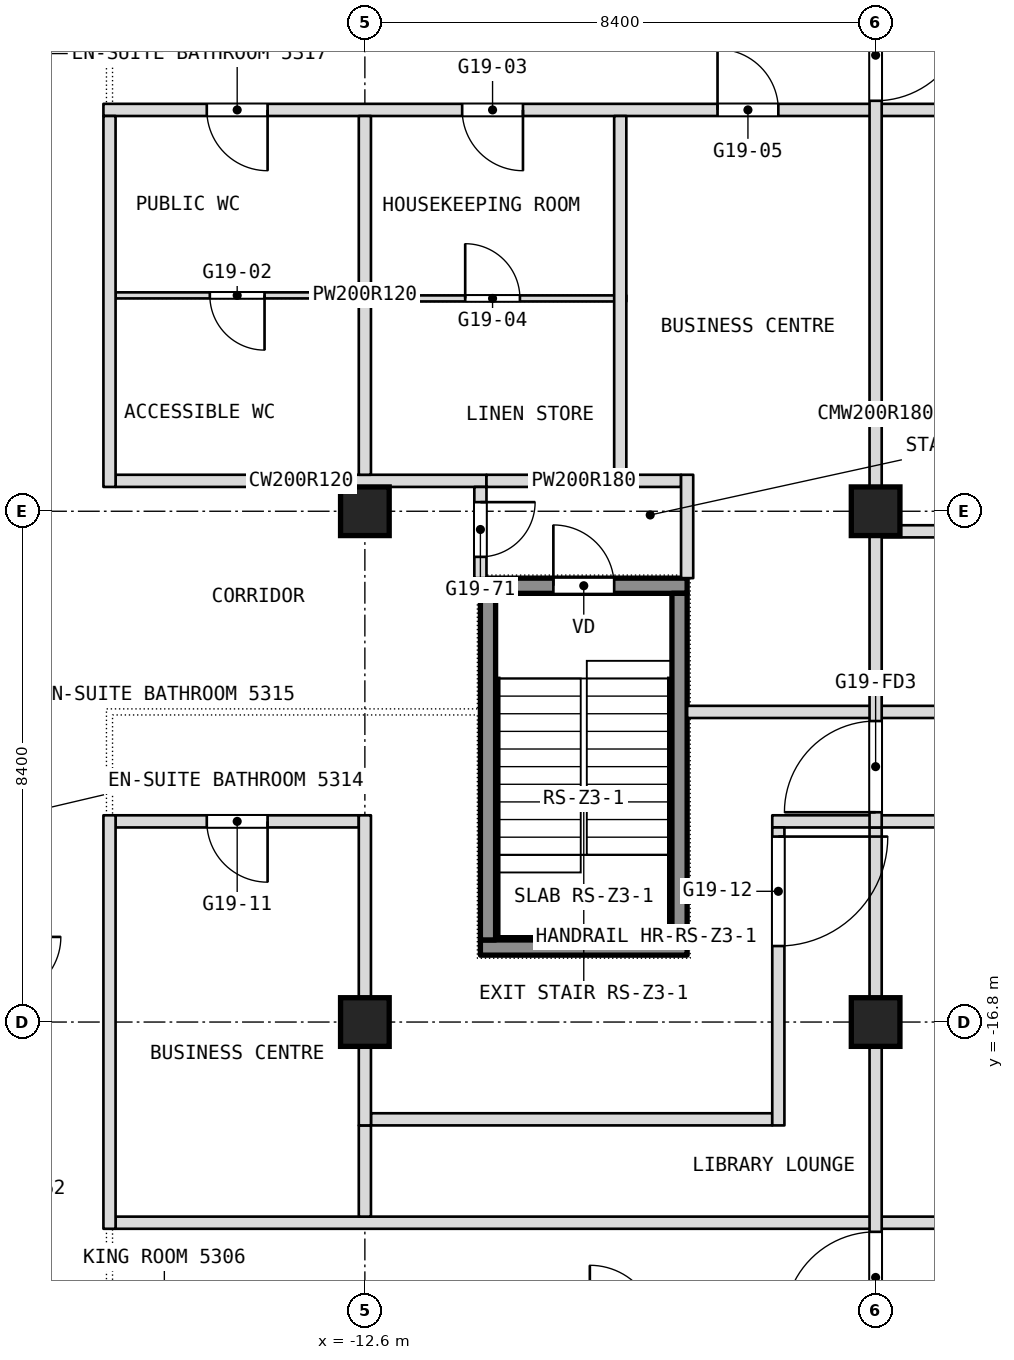
"""IFC4 building model, lengths in metres.
Left out: names, types, materials, properties, quantities, classifications, styles, units other than length and angle.
Written with IfcOpenShell. Run it as: python <this file> out.ifc"""

import sys

from ifc_helpers import new_model, si_unit, direction, frame, frame_2d, origin, origin_2d, place, context, subcontext, project, spatial, rectangle, extrude, element, fill, save


model = new_model("IFC4")
c1 = context("Model", 3, precision=1e-05, world=origin(), true_north=direction((0.0, 1.0)))
c2 = subcontext(c1, "Body", "Model", "MODEL_VIEW")
j1 = project(units=[si_unit("LENGTHUNIT", "METRE"), si_unit("PLANEANGLEUNIT", "RADIAN")], contexts=[c1])
p1 = place(None, origin())
s1 = spatial("IfcSite", under=j1, at=p1, CompositionType="ELEMENT")
p2 = place(p1, origin())
s2 = spatial("IfcBuilding", under=s1, at=p2, CompositionType="ELEMENT")
p3 = place(p2, frame((0.0, 0.0, 227.3)))
s3 = spatial("IfcBuildingStorey", under=s2, at=p3, CompositionType="ELEMENT", Elevation=227.3)
for number, where, z_axis, x_axis in (
    (1, (-12.6, -16.8, 0.0), (0.0, 0.0, 1.0), (1.0, 0.0, 0.0)),
    (2, (-12.6, -8.4, 0.0), (0.0, 0.0, 1.0), (1.0, 0.0, 0.0)),
    (3, (-4.2, -16.8, 0.0), (0.0, 0.0, 1.0), (1.0, 0.0, 0.0)),
    (4, (-4.2, -8.4, 0.0), (0.0, 0.0, 1.0), (1.0, 0.0, 0.0)),
):
    element("IfcColumn", number, at=place(p3, frame(where, z_axis=z_axis, x_axis=x_axis)), inside=s3, PredefinedType="COLUMN", context=c2, shape_type="SweptSolid", body=[
        extrude(rectangle(XDim=0.8, YDim=0.8, at=origin_2d()), origin(), (0.0, 0.0, 1.0), 3.6),
    ])
p4 = place(p3, frame((-16.7, -20.1, 0.0), z_axis=(0.0, 0.0, 1.0), x_axis=(1.0, 0.0, 0.0)))
e5 = element("IfcWall", 5, at=p4, inside=s3, PredefinedType="PARTITIONING", context=c2, shape_type="SweptSolid", body=[
    extrude(rectangle(XDim=33.4, YDim=0.2, at=frame_2d((16.7, 0.0))), origin(), (0.0, 0.0, 1.0), 3.34),
])
p5 = place(p3, frame((-12.5, -18.4, 0.0), z_axis=(0.0, 0.0, 1.0), x_axis=(1.0, 0.0, 0.0)))
e6 = element("IfcWall", 6, at=p5, inside=s3, PredefinedType="PARTITIONING", context=c2, shape_type="SweptSolid", body=[
    extrude(rectangle(XDim=6.6, YDim=0.2, at=frame_2d((3.3, 0.0))), origin(), (0.0, 0.0, 1.0), 3.34),
])
p6 = place(p3, frame((-16.7, -13.5, 0.0), z_axis=(0.0, 0.0, 1.0), x_axis=(1.0, 0.0, 0.0)))
e7 = element("IfcWall", 7, at=p6, inside=s3, PredefinedType="PARTITIONING", context=c2, shape_type="SweptSolid", body=[
    extrude(rectangle(XDim=4.0, YDim=0.2, at=frame_2d((2.0, 0.0))), origin(), (0.0, 0.0, 1.0), 3.34),
])
p7 = place(p6, frame((1.5, 0.0, 0.0)))
e8 = element("IfcOpeningElement", 8, at=p7, cuts=e7, PredefinedType="OPENING", context=c2, shape_type="SweptSolid", body=[
    extrude(rectangle(XDim=1.0, YDim=2.1, at=frame_2d((0.5, 1.05))), frame((0.0, 0.1, 0.0), z_axis=(0.0, -1.0, 0.0), x_axis=(1.0, 0.0, 0.0)), (0.0, 0.0, 1.0), 0.2),
])
p8 = place(p3, frame((-5.9, -13.5, 0.0), z_axis=(0.0, 0.0, 1.0), x_axis=(1.0, 0.0, 0.0)))
e9 = element("IfcWall", 9, at=p8, inside=s3, PredefinedType="PARTITIONING", context=c2, shape_type="SweptSolid", body=[
    extrude(rectangle(XDim=11.6, YDim=0.2, at=frame_2d((5.8, 0.0))), origin(), (0.0, 0.0, 1.0), 3.34),
])
p9 = place(p8, frame((3.3, 0.0, 0.0)))
e10 = element("IfcOpeningElement", 10, at=p9, cuts=e9, PredefinedType="OPENING", context=c2, shape_type="SweptSolid", body=[
    extrude(rectangle(XDim=1.0, YDim=2.1, at=frame_2d((0.5, 1.05))), frame((0.0, 0.1, 0.0), z_axis=(0.0, -1.0, 0.0), x_axis=(1.0, 0.0, 0.0)), (0.0, 0.0, 1.0), 0.2),
])
p10 = place(p8, frame((7.5, 0.0, 0.0)))
e11 = element("IfcOpeningElement", 11, at=p10, cuts=e9, PredefinedType="OPENING", context=c2, shape_type="SweptSolid", body=[
    extrude(rectangle(XDim=1.0, YDim=2.1, at=frame_2d((0.5, 1.05))), frame((0.0, 0.1, 0.0), z_axis=(0.0, -1.0, 0.0), x_axis=(1.0, 0.0, 0.0)), (0.0, 0.0, 1.0), 0.2),
])
p11 = place(p3, frame((-7.3, -11.7, 0.0), z_axis=(0.0, 0.0, 1.0), x_axis=(1.0, 0.0, 0.0)))
e12 = element("IfcWall", 12, at=p11, inside=s3, PredefinedType="PARTITIONING", context=c2, shape_type="SweptSolid", body=[
    extrude(rectangle(XDim=14.6, YDim=0.2, at=frame_2d((7.3, 0.0))), origin(), (0.0, 0.0, 1.0), 3.34),
])
p12 = place(p11, frame((6.8, 0.0, 0.0)))
e13 = element("IfcOpeningElement", 13, at=p12, cuts=e12, PredefinedType="OPENING", context=c2, shape_type="SweptSolid", body=[
    extrude(rectangle(XDim=1.0, YDim=2.1, at=frame_2d((0.5, 1.05))), frame((0.0, 0.1, 0.0), z_axis=(0.0, -1.0, 0.0), x_axis=(1.0, 0.0, 0.0)), (0.0, 0.0, 1.0), 0.2),
])
p13 = place(p3, frame((-4.1, -8.73, 0.0), z_axis=(0.0, 0.0, 1.0), x_axis=(1.0, 0.0, 0.0)))
e14 = element("IfcWall", 14, at=p13, inside=s3, PredefinedType="PARTITIONING", context=c2, shape_type="SweptSolid", body=[
    extrude(rectangle(XDim=8.2, YDim=0.2, at=frame_2d((4.1, 0.0))), origin(), (0.0, 0.0, 1.0), 3.34),
])
p14 = place(p3, frame((-16.7, -7.9, 0.0), z_axis=(0.0, 0.0, 1.0), x_axis=(1.0, 0.0, 0.0)))
e15 = element("IfcWall", 15, at=p14, inside=s3, PredefinedType="PARTITIONING", context=c2, shape_type="SweptSolid", body=[
    extrude(rectangle(XDim=6.1, YDim=0.2, at=frame_2d((3.05, 0.0))), origin(), (0.0, 0.0, 1.0), 3.34),
])
p15 = place(p3, frame((-10.6, -7.9, 0.0), z_axis=(0.0, 0.0, 1.0), x_axis=(1.0, 0.0, 0.0)))
e16 = element("IfcWall", 16, at=p15, inside=s3, PredefinedType="PARTITIONING", context=c2, shape_type="SweptSolid", body=[
    extrude(rectangle(XDim=3.2, YDim=0.2, at=frame_2d((1.6, 0.0))), origin(), (0.0, 0.0, 1.0), 3.34),
])
p16 = place(p3, frame((-12.5, -4.9, 0.0), z_axis=(0.0, 0.0, 1.0), x_axis=(1.0, 0.0, 0.0)))
e17 = element("IfcWall", 17, at=p16, inside=s3, PredefinedType="PARTITIONING", context=c2, shape_type="SweptSolid", body=[
    extrude(rectangle(XDim=4.2, YDim=0.1, at=frame_2d((2.1, 0.0))), origin(), (0.0, 0.0, 1.0), 3.34),
])
p17 = place(p16, frame((1.55, 0.0, 0.0)))
e18 = element("IfcOpeningElement", 18, at=p17, cuts=e17, PredefinedType="OPENING", context=c2, shape_type="SweptSolid", body=[
    extrude(rectangle(XDim=0.9, YDim=2.1, at=frame_2d((0.45, 1.05))), frame((0.0, 0.05, 0.0), z_axis=(0.0, -1.0, 0.0), x_axis=(1.0, 0.0, 0.0)), (0.0, 0.0, 1.0), 0.1),
])
p18 = place(p3, frame((-16.7, -4.85, 0.0), z_axis=(0.0, 0.0, 1.0), x_axis=(1.0, 0.0, 0.0)))
e19 = element("IfcWall", 19, at=p18, inside=s3, PredefinedType="PARTITIONING", context=c2, shape_type="SweptSolid", body=[
    extrude(rectangle(XDim=4.2, YDim=0.1, at=frame_2d((2.1, 0.0))), origin(), (0.0, 0.0, 1.0), 3.34),
])
p19 = place(p18, frame((1.55, 0.0, 0.0)))
e20 = element("IfcOpeningElement", 20, at=p19, cuts=e19, PredefinedType="OPENING", context=c2, shape_type="SweptSolid", body=[
    extrude(rectangle(XDim=0.9, YDim=2.1, at=frame_2d((0.45, 1.05))), frame((0.0, 0.05, 0.0), z_axis=(0.0, -1.0, 0.0), x_axis=(1.0, 0.0, 0.0)), (0.0, 0.0, 1.0), 0.1),
])
p20 = place(p3, frame((-16.9, -1.8, 0.0), z_axis=(0.0, 0.0, 1.0), x_axis=(1.0, 0.0, 0.0)))
e21 = element("IfcWall", 21, at=p20, inside=s3, PredefinedType="PARTITIONING", context=c2, shape_type="SweptSolid", body=[
    extrude(rectangle(XDim=33.8, YDim=0.2, at=frame_2d((16.9, 0.0))), origin(), (0.0, 0.0, 1.0), 3.34),
])
p21 = place(p20, frame((1.7, 0.0, 0.0)))
e22 = element("IfcOpeningElement", 22, at=p21, cuts=e21, PredefinedType="OPENING", context=c2, shape_type="SweptSolid", body=[
    extrude(rectangle(XDim=1.0, YDim=2.1, at=frame_2d((0.5, 1.05))), frame((0.0, 0.1, 0.0), z_axis=(0.0, -1.0, 0.0), x_axis=(1.0, 0.0, 0.0)), (0.0, 0.0, 1.0), 0.2),
])
p22 = place(p20, frame((5.9, 0.0, 0.0)))
e23 = element("IfcOpeningElement", 23, at=p22, cuts=e21, PredefinedType="OPENING", context=c2, shape_type="SweptSolid", body=[
    extrude(rectangle(XDim=1.0, YDim=2.1, at=frame_2d((0.5, 1.05))), frame((0.0, 0.1, 0.0), z_axis=(0.0, -1.0, 0.0), x_axis=(1.0, 0.0, 0.0)), (0.0, 0.0, 1.0), 0.2),
])
p23 = place(p20, frame((10.1, 0.0, 0.0)))
e24 = element("IfcOpeningElement", 24, at=p23, cuts=e21, PredefinedType="OPENING", context=c2, shape_type="SweptSolid", body=[
    extrude(rectangle(XDim=1.0, YDim=2.1, at=frame_2d((0.5, 1.05))), frame((0.0, 0.1, 0.0), z_axis=(0.0, -1.0, 0.0), x_axis=(1.0, 0.0, 0.0)), (0.0, 0.0, 1.0), 0.2),
])
p24 = place(p20, frame((22.7, 0.0, 0.0)))
e25 = element("IfcOpeningElement", 25, at=p24, cuts=e21, PredefinedType="OPENING", context=c2, shape_type="SweptSolid", body=[
    extrude(rectangle(XDim=1.0, YDim=2.1, at=frame_2d((0.5, 1.05))), frame((0.0, 0.1, 0.0), z_axis=(0.0, -1.0, 0.0), x_axis=(1.0, 0.0, 0.0)), (0.0, 0.0, 1.0), 0.2),
])
p25 = place(p20, frame((26.9, 0.0, 0.0)))
e26 = element("IfcOpeningElement", 26, at=p25, cuts=e21, PredefinedType="OPENING", context=c2, shape_type="SweptSolid", body=[
    extrude(rectangle(XDim=1.0, YDim=2.1, at=frame_2d((0.5, 1.05))), frame((0.0, 0.1, 0.0), z_axis=(0.0, -1.0, 0.0), x_axis=(1.0, 0.0, 0.0)), (0.0, 0.0, 1.0), 0.2),
])
p26 = place(p20, frame((31.1, 0.0, 0.0)))
e27 = element("IfcOpeningElement", 27, at=p26, cuts=e21, PredefinedType="OPENING", context=c2, shape_type="SweptSolid", body=[
    extrude(rectangle(XDim=1.0, YDim=2.1, at=frame_2d((0.5, 1.05))), frame((0.0, 0.1, 0.0), z_axis=(0.0, -1.0, 0.0), x_axis=(1.0, 0.0, 0.0)), (0.0, 0.0, 1.0), 0.2),
])
p27 = place(p20, frame((16.4, 0.0, 0.0)))
e28 = element("IfcOpeningElement", 28, at=p27, cuts=e21, PredefinedType="OPENING", context=c2, shape_type="SweptSolid", body=[
    extrude(rectangle(XDim=1.0, YDim=2.1, at=frame_2d((0.5, 1.05))), frame((0.0, 0.1, 0.0), z_axis=(0.0, -1.0, 0.0), x_axis=(1.0, 0.0, 0.0)), (0.0, 0.0, 1.0), 0.2),
])
p28 = place(p3, frame((-4.2, -22.0, 0.0), z_axis=(0.0, 0.0, 1.0), x_axis=(0.0, 1.0, 0.0)))
e29 = element("IfcWall", 29, at=p28, inside=s3, PredefinedType="PARTITIONING", context=c2, shape_type="SweptSolid", body=[
    extrude(rectangle(XDim=8.4, YDim=0.2, at=frame_2d((4.2, 0.0))), origin(), (0.0, 0.0, 1.0), 3.34),
])
p29 = place(p28, frame((0.25, 0.0, 0.0)))
e30 = element("IfcOpeningElement", 30, at=p29, cuts=e29, PredefinedType="OPENING", context=c2, shape_type="SweptSolid", body=[
    extrude(rectangle(XDim=1.5, YDim=2.1, at=frame_2d((0.75, 1.05))), frame((0.0, 0.1, 0.0), z_axis=(0.0, -1.0, 0.0), x_axis=(1.0, 0.0, 0.0)), (0.0, 0.0, 1.0), 0.2),
])
p30 = place(p3, frame((-4.2, -13.6, 0.0), z_axis=(0.0, 0.0, 1.0), x_axis=(0.0, 1.0, 0.0)))
e31 = element("IfcWall", 31, at=p30, inside=s3, PredefinedType="PARTITIONING", context=c2, shape_type="SweptSolid", body=[
    extrude(rectangle(XDim=13.6, YDim=0.2, at=frame_2d((6.8, 0.0))), origin(), (0.0, 0.0, 1.0), 3.34),
])
p31 = place(p30, frame((11.95, 0.0, 0.0)))
e32 = element("IfcOpeningElement", 32, at=p31, cuts=e31, PredefinedType="OPENING", context=c2, shape_type="SweptSolid", body=[
    extrude(rectangle(XDim=1.5, YDim=2.1, at=frame_2d((0.75, 1.05))), frame((0.0, 0.1, 0.0), z_axis=(0.0, -1.0, 0.0), x_axis=(1.0, 0.0, 0.0)), (0.0, 0.0, 1.0), 0.2),
])
p32 = place(p30, frame((0.25, 0.0, 0.0)))
e33 = element("IfcOpeningElement", 33, at=p32, cuts=e31, PredefinedType="OPENING", context=c2, shape_type="SweptSolid", body=[
    extrude(rectangle(XDim=1.5, YDim=2.1, at=frame_2d((0.75, 1.05))), frame((0.0, 0.1, 0.0), z_axis=(0.0, -1.0, 0.0), x_axis=(1.0, 0.0, 0.0)), (0.0, 0.0, 1.0), 0.2),
])
p33 = place(p3, frame((-5.8, -18.5, 0.0), z_axis=(0.0, 0.0, 1.0), x_axis=(0.0, 1.0, 0.0)))
e34 = element("IfcWall", 34, at=p33, inside=s3, PredefinedType="PARTITIONING", context=c2, shape_type="SweptSolid", body=[
    extrude(rectangle(XDim=4.9, YDim=0.2, at=frame_2d((2.45, 0.0))), origin(), (0.0, 0.0, 1.0), 3.34),
])
p34 = place(p33, frame((2.95, 0.0, 0.0)))
e35 = element("IfcOpeningElement", 35, at=p34, cuts=e34, PredefinedType="OPENING", context=c2, shape_type="SweptSolid", body=[
    extrude(rectangle(XDim=1.8, YDim=2.1, at=frame_2d((0.9, 1.05))), frame((0.0, 0.1, 0.0), z_axis=(0.0, -1.0, 0.0), x_axis=(1.0, 0.0, 0.0)), (0.0, 0.0, 1.0), 0.2),
])
p35 = place(p3, frame((-7.3, -9.5, 0.0), z_axis=(0.0, 0.0, 1.0), x_axis=(0.0, 1.0, 0.0)))
e36 = element("IfcWall", 36, at=p35, inside=s3, PredefinedType="PARTITIONING", context=c2, shape_type="SweptSolid", body=[
    extrude(rectangle(XDim=1.7, YDim=0.2, at=frame_2d((0.85, 0.0))), origin(), (0.0, 0.0, 1.0), 3.34),
])
p36 = place(p3, frame((-8.4, -8.0, 0.0), z_axis=(0.0, 0.0, 1.0), x_axis=(0.0, 1.0, 0.0)))
e37 = element("IfcWall", 37, at=p36, inside=s3, PredefinedType="PARTITIONING", context=c2, shape_type="SweptSolid", body=[
    extrude(rectangle(XDim=6.1, YDim=0.2, at=frame_2d((3.05, 0.0))), origin(), (0.0, 0.0, 1.0), 3.34),
])
p37 = place(p3, frame((-10.7, -9.5, 0.0), z_axis=(0.0, 0.0, 1.0), x_axis=(0.0, 1.0, 0.0)))
e38 = element("IfcWall", 38, at=p37, inside=s3, PredefinedType="PARTITIONING", context=c2, shape_type="SweptSolid", body=[
    extrude(rectangle(XDim=1.5, YDim=0.2, at=frame_2d((0.75, 0.0))), origin(), (0.0, 0.0, 1.0), 3.34),
])
p38 = place(p37, frame((0.35, 0.0, 0.0)))
e39 = element("IfcOpeningElement", 39, at=p38, cuts=e38, PredefinedType="OPENING", context=c2, shape_type="SweptSolid", body=[
    extrude(rectangle(XDim=0.9, YDim=2.1, at=frame_2d((0.45, 1.05))), frame((0.0, 0.1, 0.0), z_axis=(0.0, -1.0, 0.0), x_axis=(1.0, 0.0, 0.0)), (0.0, 0.0, 1.0), 0.2),
])
p39 = place(p3, frame((-12.6, -20.0, 0.0), z_axis=(0.0, 0.0, 1.0), x_axis=(0.0, 1.0, 0.0)))
e40 = element("IfcWall", 40, at=p39, inside=s3, PredefinedType="PARTITIONING", context=c2, shape_type="SweptSolid", body=[
    extrude(rectangle(XDim=1.5, YDim=0.2, at=frame_2d((0.75, 0.0))), origin(), (0.0, 0.0, 1.0), 3.34),
])
p40 = place(p3, frame((-12.6, -7.8, 0.0), z_axis=(0.0, 0.0, 1.0), x_axis=(0.0, 1.0, 0.0)))
e41 = element("IfcWall", 41, at=p40, inside=s3, PredefinedType="PARTITIONING", context=c2, shape_type="SweptSolid", body=[
    extrude(rectangle(XDim=5.9, YDim=0.2, at=frame_2d((2.95, 0.0))), origin(), (0.0, 0.0, 1.0), 3.34),
])
p41 = place(p3, frame((-12.6, -18.5, 0.0), z_axis=(0.0, 0.0, 1.0), x_axis=(0.0, 1.0, 0.0)))
e42 = element("IfcWall", 42, at=p41, inside=s3, PredefinedType="PARTITIONING", context=c2, shape_type="SweptSolid", body=[
    extrude(rectangle(XDim=5.1, YDim=0.2, at=frame_2d((2.55, 0.0))), origin(), (0.0, 0.0, 1.0), 3.34),
])
p42 = place(p3, frame((-16.8, -20.2, 0.0), z_axis=(0.0, 0.0, 1.0), x_axis=(0.0, 1.0, 0.0)))
e43 = element("IfcWall", 43, at=p42, inside=s3, PredefinedType="PARTITIONING", context=c2, shape_type="SweptSolid", body=[
    extrude(rectangle(XDim=6.8, YDim=0.2, at=frame_2d((3.4, 0.0))), origin(), (0.0, 0.0, 1.0), 3.34),
])
p43 = place(p3, frame((-16.8, -8.0, 0.0), z_axis=(0.0, 0.0, 1.0), x_axis=(0.0, 1.0, 0.0)))
e44 = element("IfcWall", 44, at=p43, inside=s3, PredefinedType="PARTITIONING", context=c2, shape_type="SweptSolid", body=[
    extrude(rectangle(XDim=6.1, YDim=0.2, at=frame_2d((3.05, 0.0))), origin(), (0.0, 0.0, 1.0), 3.34),
])
p44 = place(p3, frame((-10.7, -15.575, 0.1), z_axis=(0.0, 0.0, 1.0), x_axis=(1.0, 0.0, 0.0)))
e45 = element("IfcWall", 45, at=p44, inside=s3, PredefinedType="SHEAR", context=c2, shape_type="SweptSolid", body=[
    extrude(rectangle(XDim=3.4, YDim=0.25, at=frame_2d((1.7, 0.0))), origin(), (0.0, 0.0, 1.0), 3.6),
])
p45 = place(p3, frame((-10.7, -9.625, 0.1), z_axis=(0.0, 0.0, 1.0), x_axis=(1.0, 0.0, 0.0)))
e46 = element("IfcWall", 46, at=p45, inside=s3, PredefinedType="SHEAR", context=c2, shape_type="SweptSolid", body=[
    extrude(rectangle(XDim=3.4, YDim=0.25, at=frame_2d((1.7, 0.0))), origin(), (0.0, 0.0, 1.0), 3.6),
])
p46 = place(p45, frame((1.2, 0.0, 0.0)))
e47 = element("IfcOpeningElement", 47, at=p46, cuts=e46, PredefinedType="OPENING", context=c2, shape_type="SweptSolid", body=[
    extrude(rectangle(XDim=1.0, YDim=2.1, at=frame_2d((0.5, 1.05))), frame((0.0, 0.125, 0.0), z_axis=(0.0, -1.0, 0.0), x_axis=(1.0, 0.0, 0.0)), (0.0, 0.0, 1.0), 0.25),
])
for number, where, z_axis, x_axis in (
    (48, (-10.575, -15.45, 0.1), (0.0, 0.0, 1.0), (0.0, 1.0, 0.0)),
    (49, (-7.425, -15.45, 0.1), (0.0, 0.0, 1.0), (0.0, 1.0, 0.0)),
):
    element("IfcWall", number, at=place(p3, frame(where, z_axis=z_axis, x_axis=x_axis)), inside=s3, PredefinedType="SHEAR", context=c2, shape_type="SweptSolid", body=[
        extrude(rectangle(XDim=5.7, YDim=0.25, at=frame_2d((2.85, 0.0))), origin(), (0.0, 0.0, 1.0), 3.6),
    ])
p47 = place(p7, origin())
e50 = element("IfcDoor", 50, at=p47, inside=s3, OperationType="SINGLE_SWING_LEFT", PredefinedType="DOOR", context=c2, shape_type="SweptSolid", body=[
    extrude(rectangle(XDim=1.0, YDim=2.1, at=frame_2d((0.5, 1.05))), frame((0.0, 0.025, 0.0), z_axis=(0.0, -1.0, 0.0), x_axis=(1.0, 0.0, 0.0)), (0.0, 0.0, 1.0), 0.05),
])
fill(e8, e50)
p48 = place(p17, origin())
e51 = element("IfcDoor", 51, at=p48, inside=s3, OperationType="SINGLE_SWING_RIGHT", PredefinedType="DOOR", context=c2, shape_type="SweptSolid", body=[
    extrude(rectangle(XDim=0.9, YDim=2.1, at=frame_2d((0.45, 1.05))), frame((0.0, 0.025, 0.0), z_axis=(0.0, -1.0, 0.0), x_axis=(1.0, 0.0, 0.0)), (0.0, 0.0, 1.0), 0.05),
])
fill(e18, e51)
p49 = place(p19, origin())
e52 = element("IfcDoor", 52, at=p49, inside=s3, OperationType="SINGLE_SWING_RIGHT", PredefinedType="DOOR", context=c2, shape_type="SweptSolid", body=[
    extrude(rectangle(XDim=0.9, YDim=2.1, at=frame_2d((0.45, 1.05))), frame((0.0, 0.025, 0.0), z_axis=(0.0, -1.0, 0.0), x_axis=(1.0, 0.0, 0.0)), (0.0, 0.0, 1.0), 0.05),
])
fill(e20, e52)
p50 = place(p21, origin())
e53 = element("IfcDoor", 53, at=p50, inside=s3, OperationType="SINGLE_SWING_LEFT", PredefinedType="DOOR", context=c2, shape_type="SweptSolid", body=[
    extrude(rectangle(XDim=1.0, YDim=2.1, at=frame_2d((0.5, 1.05))), frame((0.0, 0.025, 0.0), z_axis=(0.0, -1.0, 0.0), x_axis=(1.0, 0.0, 0.0)), (0.0, 0.0, 1.0), 0.05),
])
fill(e22, e53)
p51 = place(p22, origin())
e54 = element("IfcDoor", 54, at=p51, inside=s3, OperationType="SINGLE_SWING_LEFT", PredefinedType="DOOR", context=c2, shape_type="SweptSolid", body=[
    extrude(rectangle(XDim=1.0, YDim=2.1, at=frame_2d((0.5, 1.05))), frame((0.0, 0.025, 0.0), z_axis=(0.0, -1.0, 0.0), x_axis=(1.0, 0.0, 0.0)), (0.0, 0.0, 1.0), 0.05),
])
fill(e23, e54)
p52 = place(p23, origin())
e55 = element("IfcDoor", 55, at=p52, inside=s3, OperationType="SINGLE_SWING_RIGHT", PredefinedType="DOOR", context=c2, shape_type="SweptSolid", body=[
    extrude(rectangle(XDim=1.0, YDim=2.1, at=frame_2d((0.5, 1.05))), frame((0.0, 0.025, 0.0), z_axis=(0.0, -1.0, 0.0), x_axis=(1.0, 0.0, 0.0)), (0.0, 0.0, 1.0), 0.05),
])
fill(e24, e55)
p53 = place(p34, origin())
e56 = element("IfcDoor", 56, at=p53, inside=s3, OperationType="DOUBLE_DOOR_SINGLE_SWING", PredefinedType="DOOR", context=c2, shape_type="SweptSolid", body=[
    extrude(rectangle(XDim=1.8, YDim=2.1, at=frame_2d((0.9, 1.05))), frame((0.0, 0.025, 0.0), z_axis=(0.0, -1.0, 0.0), x_axis=(1.0, 0.0, 0.0)), (0.0, 0.0, 1.0), 0.05),
])
fill(e35, e56)
p54 = place(p38, origin())
e57 = element("IfcDoor", 57, at=p54, inside=s3, OperationType="SINGLE_SWING_LEFT", PredefinedType="DOOR", context=c2, shape_type="SweptSolid", body=[
    extrude(rectangle(XDim=0.9, YDim=2.1, at=frame_2d((0.45, 1.05))), frame((0.0, 0.025, 0.0), z_axis=(0.0, -1.0, 0.0), x_axis=(1.0, 0.0, 0.0)), (0.0, 0.0, 1.0), 0.05),
])
fill(e39, e57)
p55 = place(p46, origin())
e58 = element("IfcDoor", 58, at=p55, inside=s3, OperationType="SINGLE_SWING_LEFT", PredefinedType="DOOR", context=c2, shape_type="SweptSolid", body=[
    extrude(rectangle(XDim=1.0, YDim=2.1, at=frame_2d((0.5, 1.05))), frame((0.0, 0.025, 0.0), z_axis=(0.0, -1.0, 0.0), x_axis=(1.0, 0.0, 0.0)), (0.0, 0.0, 1.0), 0.05),
])
fill(e47, e58)
p56 = place(p31, origin())
e59 = element("IfcDoor", 59, at=p56, inside=s3, OperationType="DOUBLE_DOOR_DOUBLE_SWING", PredefinedType="DOOR", context=c2, shape_type="SweptSolid", body=[
    extrude(rectangle(XDim=1.5, YDim=2.1, at=frame_2d((0.75, 1.05))), frame((0.0, 0.025, 0.0), z_axis=(0.0, -1.0, 0.0), x_axis=(1.0, 0.0, 0.0)), (0.0, 0.0, 1.0), 0.05),
])
fill(e32, e59)
p57 = place(p32, origin())
e60 = element("IfcDoor", 60, at=p57, inside=s3, OperationType="DOUBLE_DOOR_DOUBLE_SWING", PredefinedType="DOOR", context=c2, shape_type="SweptSolid", body=[
    extrude(rectangle(XDim=1.5, YDim=2.1, at=frame_2d((0.75, 1.05))), frame((0.0, 0.025, 0.0), z_axis=(0.0, -1.0, 0.0), x_axis=(1.0, 0.0, 0.0)), (0.0, 0.0, 1.0), 0.05),
])
fill(e33, e60)
p58 = place(p29, origin())
e61 = element("IfcDoor", 61, at=p58, inside=s3, OperationType="DOUBLE_DOOR_DOUBLE_SWING", PredefinedType="DOOR", context=c2, shape_type="SweptSolid", body=[
    extrude(rectangle(XDim=1.5, YDim=2.1, at=frame_2d((0.75, 1.05))), frame((0.0, 0.025, 0.0), z_axis=(0.0, -1.0, 0.0), x_axis=(1.0, 0.0, 0.0)), (0.0, 0.0, 1.0), 0.05),
])
fill(e30, e61)
save(model, sys.argv[1])
